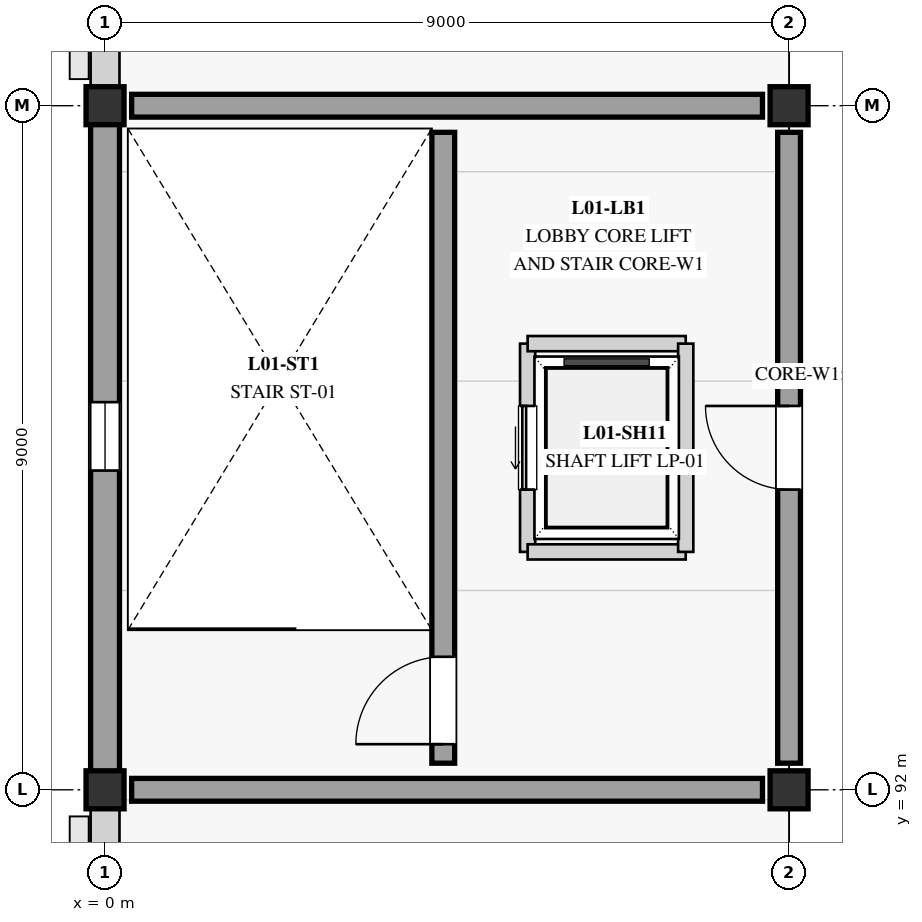
"""IFC4 building model, lengths in metres.
Left out: names, types, materials, properties, quantities, classifications, styles, units other than length and angle.
Written with IfcOpenShell. Run it as: python <this file> out.ifc"""

import sys

from ifc_helpers import new_model, si_unit, direction, frame, frame_2d, origin, origin_2d, place, context, subcontext, project, spatial, rectangle, extrude, element, fill, save


model = new_model("IFC4")
c1 = context("Model", 3, precision=1e-05, world=origin(), true_north=direction((0.0, 1.0)))
c2 = subcontext(c1, "Body", "Model", "MODEL_VIEW")
j1 = project(units=[si_unit("LENGTHUNIT", "METRE"), si_unit("PLANEANGLEUNIT", "RADIAN")], contexts=[c1])
p1 = place(None, origin())
s1 = spatial("IfcSite", under=j1, at=p1, CompositionType="ELEMENT")
p2 = place(p1, origin())
s2 = spatial("IfcBuilding", under=s1, at=p2, CompositionType="ELEMENT")
p3 = place(p2, frame((0.0, 0.0, 4.5)))
s3 = spatial("IfcBuildingStorey", under=s2, at=p3, CompositionType="ELEMENT", Elevation=4.5)
for number, where, z_axis, x_axis in (
    (1, (0.0, 92.0, 0.0), (0.0, 0.0, 1.0), (1.0, 0.0, 0.0)),
    (2, (0.0, 101.0, 0.0), (0.0, 0.0, 1.0), (1.0, 0.0, 0.0)),
):
    element("IfcColumn", number, at=place(p3, frame(where, z_axis=z_axis, x_axis=x_axis)), inside=s3, PredefinedType="COLUMN", context=c2, shape_type="SweptSolid", body=[
        extrude(rectangle(XDim=0.5, YDim=0.5, at=origin_2d()), origin(), (0.0, 0.0, 1.0), 3.59),
    ])
for number, where, z_axis, x_axis in (
    (3, (9.0, 92.0, 0.0), (0.0, 0.0, 1.0), (1.0, 0.0, 0.0)),
    (4, (9.0, 101.0, 0.0), (0.0, 0.0, 1.0), (1.0, 0.0, 0.0)),
):
    element("IfcColumn", number, at=place(p3, frame(where, z_axis=z_axis, x_axis=x_axis)), inside=s3, PredefinedType="COLUMN", context=c2, shape_type="SweptSolid", body=[
        extrude(rectangle(XDim=0.5, YDim=0.5, at=origin_2d()), origin(), (0.0, 0.0, 1.0), 5.59),
    ])
p4 = place(p3, frame((0.0, 83.0, 0.0), z_axis=(0.0, 0.0, 1.0), x_axis=(0.0, 1.0, 0.0)))
e5 = element("IfcWall", 5, at=p4, inside=s3, PredefinedType="STANDARD", context=c2, shape_type="SweptSolid", body=[
    extrude(rectangle(XDim=9.0, YDim=0.38, at=frame_2d((4.5, 0.0))), origin(), (0.0, 0.0, 1.0), 3.48),
])
p5 = place(p4, frame((2.1, 0.0, 0.95)))
e6 = element("IfcOpeningElement", 6, at=p5, cuts=e5, PredefinedType="OPENING", context=c2, shape_type="SweptSolid", body=[
    extrude(rectangle(XDim=1.6, YDim=2.1, at=frame_2d((0.8, 1.05))), frame((0.0, 0.2, 0.0), z_axis=(0.0, -1.0, 0.0), x_axis=(1.0, 0.0, 0.0)), (0.0, 0.0, 1.0), 0.4),
])
p6 = place(p4, frame((5.3, 0.0, 0.95)))
e7 = element("IfcOpeningElement", 7, at=p6, cuts=e5, PredefinedType="OPENING", context=c2, shape_type="SweptSolid", body=[
    extrude(rectangle(XDim=1.6, YDim=2.1, at=frame_2d((0.8, 1.05))), frame((0.0, 0.2, 0.0), z_axis=(0.0, -1.0, 0.0), x_axis=(1.0, 0.0, 0.0)), (0.0, 0.0, 1.0), 0.4),
])
p7 = place(p3, frame((0.0, 92.0, 0.0), z_axis=(0.0, 0.0, 1.0), x_axis=(0.0, 1.0, 0.0)))
e8 = element("IfcWall", 8, at=p7, inside=s3, PredefinedType="STANDARD", context=c2, shape_type="SweptSolid", body=[
    extrude(rectangle(XDim=9.0, YDim=0.38, at=frame_2d((4.5, 0.0))), origin(), (0.0, 0.0, 1.0), 3.48),
])
p8 = place(p7, frame((4.2, 0.0, 0.9)))
e9 = element("IfcOpeningElement", 9, at=p8, cuts=e8, PredefinedType="OPENING", context=c2, shape_type="SweptSolid", body=[
    extrude(rectangle(XDim=0.9, YDim=2.4, at=frame_2d((0.45, 1.2))), frame((0.0, 0.2, 0.0), z_axis=(0.0, -1.0, 0.0), x_axis=(1.0, 0.0, 0.0)), (0.0, 0.0, 1.0), 0.4),
])
p9 = place(p3, frame((0.0, 101.0, 0.0), z_axis=(0.0, 0.0, 1.0), x_axis=(0.0, 1.0, 0.0)))
e10 = element("IfcWall", 10, at=p9, inside=s3, PredefinedType="STANDARD", context=c2, shape_type="SweptSolid", body=[
    extrude(rectangle(XDim=9.0, YDim=0.38, at=frame_2d((4.5, 0.0))), origin(), (0.0, 0.0, 1.0), 3.48),
])
p10 = place(p9, frame((2.1, 0.0, 0.95)))
e11 = element("IfcOpeningElement", 11, at=p10, cuts=e10, PredefinedType="OPENING", context=c2, shape_type="SweptSolid", body=[
    extrude(rectangle(XDim=2.2, YDim=2.1, at=frame_2d((1.1, 1.05))), frame((0.0, 0.2, 0.0), z_axis=(0.0, -1.0, 0.0), x_axis=(1.0, 0.0, 0.0)), (0.0, 0.0, 1.0), 0.4),
])
p11 = place(p9, frame((4.7, 0.0, 0.95)))
e12 = element("IfcOpeningElement", 12, at=p11, cuts=e10, PredefinedType="OPENING", context=c2, shape_type="SweptSolid", body=[
    extrude(rectangle(XDim=2.2, YDim=2.1, at=frame_2d((1.1, 1.05))), frame((0.0, 0.2, 0.0), z_axis=(0.0, -1.0, 0.0), x_axis=(1.0, 0.0, 0.0)), (0.0, 0.0, 1.0), 0.4),
])
p12 = place(p3, frame((4.45, 92.35, 0.0), z_axis=(0.0, 0.0, 1.0), x_axis=(0.0, 1.0, 0.0)))
e13 = element("IfcWall", 13, at=p12, inside=s3, PredefinedType="SHEAR", context=c2, shape_type="SweptSolid", body=[
    extrude(rectangle(XDim=8.3, YDim=0.3, at=frame_2d((4.15, 0.0))), origin(), (0.0, 0.0, 1.0), 3.62),
])
p13 = place(p12, frame((0.25, 0.0, 0.0)))
e14 = element("IfcOpeningElement", 14, at=p13, cuts=e13, PredefinedType="OPENING", context=c2, shape_type="SweptSolid", body=[
    extrude(rectangle(XDim=1.15, YDim=2.15, at=frame_2d((0.575, 1.075))), frame((0.0, 0.16, 0.0), z_axis=(0.0, -1.0, 0.0), x_axis=(1.0, 0.0, 0.0)), (0.0, 0.0, 1.0), 0.32),
])
p14 = place(p3, frame((9.0, 92.35, 0.0), z_axis=(0.0, 0.0, 1.0), x_axis=(0.0, 1.0, 0.0)))
e15 = element("IfcWall", 15, at=p14, inside=s3, PredefinedType="SHEAR", context=c2, shape_type="SweptSolid", body=[
    extrude(rectangle(XDim=8.3, YDim=0.3, at=frame_2d((4.15, 0.0))), origin(), (0.0, 0.0, 1.0), 3.62),
])
p15 = place(p14, frame((3.6, 0.0, 0.0)))
e16 = element("IfcOpeningElement", 16, at=p15, cuts=e15, PredefinedType="OPENING", context=c2, shape_type="SweptSolid", body=[
    extrude(rectangle(XDim=1.1, YDim=2.1, at=frame_2d((0.55, 1.05))), frame((0.0, 0.16, 0.0), z_axis=(0.0, -1.0, 0.0), x_axis=(1.0, 0.0, 0.0)), (0.0, 0.0, 1.0), 0.32),
])
for number, where, z_axis, x_axis in (
    (17, (0.35, 92.0, 0.0), (0.0, 0.0, 1.0), (1.0, 0.0, 0.0)),
    (18, (0.35, 101.0, 0.0), (0.0, 0.0, 1.0), (1.0, 0.0, 0.0)),
):
    element("IfcWall", number, at=place(p3, frame(where, z_axis=z_axis, x_axis=x_axis)), inside=s3, PredefinedType="SHEAR", context=c2, shape_type="SweptSolid", body=[
        extrude(rectangle(XDim=8.3, YDim=0.3, at=frame_2d((4.15, 0.0))), origin(), (0.0, 0.0, 1.0), 3.62),
    ])
p16 = place(p3, frame((5.56, 95.13, 0.0), z_axis=(0.0, 0.0, 1.0), x_axis=(0.0, 1.0, 0.0)))
e19 = element("IfcWall", 19, at=p16, inside=s3, PredefinedType="SOLIDWALL", context=c2, shape_type="SweptSolid", body=[
    extrude(rectangle(XDim=2.74, YDim=0.2, at=frame_2d((1.37, 0.0))), origin(), (0.0, 0.0, 1.0), 2.65),
])
p17 = place(p16, frame((0.82, 0.0, 0.0)))
e20 = element("IfcOpeningElement", 20, at=p17, cuts=e19, PredefinedType="OPENING", context=c2, shape_type="SweptSolid", body=[
    extrude(rectangle(XDim=1.1, YDim=2.1, at=frame_2d((0.55, 1.05))), frame((0.0, 0.11, 0.0), z_axis=(0.0, -1.0, 0.0), x_axis=(1.0, 0.0, 0.0)), (0.0, 0.0, 1.0), 0.22),
])
for number, where, z_axis, x_axis in (
    (21, (5.56, 95.13, 0.0), (0.0, 0.0, 1.0), (1.0, 0.0, 0.0)),
    (22, (5.56, 97.87, 0.0), (0.0, 0.0, 1.0), (1.0, 0.0, 0.0)),
):
    element("IfcWall", number, at=place(p3, frame(where, z_axis=z_axis, x_axis=x_axis)), inside=s3, PredefinedType="SOLIDWALL", context=c2, shape_type="SweptSolid", body=[
        extrude(rectangle(XDim=2.08, YDim=0.2, at=frame_2d((1.04, 0.0))), origin(), (0.0, 0.0, 1.0), 2.65),
    ])
p18 = place(p3, frame((7.64, 95.13, 0.0), z_axis=(0.0, 0.0, 1.0), x_axis=(0.0, 1.0, 0.0)))
e23 = element("IfcWall", 23, at=p18, inside=s3, PredefinedType="SOLIDWALL", context=c2, shape_type="SweptSolid", body=[
    extrude(rectangle(XDim=2.74, YDim=0.2, at=frame_2d((1.37, 0.0))), origin(), (0.0, 0.0, 1.0), 2.65),
])
p19 = place(p8, origin())
e24 = element("IfcWindow", 24, at=p19, inside=s3, PartitioningType="SINGLE_PANEL", PredefinedType="WINDOW", context=c2, shape_type="SweptSolid", body=[
    extrude(rectangle(XDim=0.9, YDim=2.4, at=frame_2d((0.45, 1.2))), frame((0.0, 0.03, 0.0), z_axis=(0.0, -1.0, 0.0), x_axis=(1.0, 0.0, 0.0)), (0.0, 0.0, 1.0), 0.06),
])
fill(e9, e24)
p20 = place(p13, origin())
e25 = element("IfcDoor", 25, at=p20, inside=s3, OperationType="SINGLE_SWING_LEFT", PredefinedType="DOOR", context=c2, shape_type="SweptSolid", body=[
    extrude(rectangle(XDim=1.15, YDim=2.15, at=frame_2d((0.575, 1.075))), frame((0.0, 0.025, 0.0), z_axis=(0.0, -1.0, 0.0), x_axis=(1.0, 0.0, 0.0)), (0.0, 0.0, 1.0), 0.05),
])
fill(e14, e25)
p21 = place(p15, origin())
e26 = element("IfcDoor", 26, at=p21, inside=s3, OperationType="SINGLE_SWING_RIGHT", PredefinedType="DOOR", context=c2, shape_type="SweptSolid", body=[
    extrude(rectangle(XDim=1.1, YDim=2.1, at=frame_2d((0.55, 1.05))), frame((0.0, 0.025, 0.0), z_axis=(0.0, -1.0, 0.0), x_axis=(1.0, 0.0, 0.0)), (0.0, 0.0, 1.0), 0.05),
])
fill(e16, e26)
p22 = place(p17, origin())
e27 = element("IfcDoor", 27, at=p22, inside=s3, OperationType="SLIDING_TO_LEFT", PredefinedType="DOOR", context=c2, shape_type="SweptSolid", body=[
    extrude(rectangle(XDim=1.1, YDim=2.1, at=frame_2d((0.55, 1.05))), frame((0.0, 0.025, 0.0), z_axis=(0.0, -1.0, 0.0), x_axis=(1.0, 0.0, 0.0)), (0.0, 0.0, 1.0), 0.05),
])
fill(e20, e27)
save(model, sys.argv[1])
